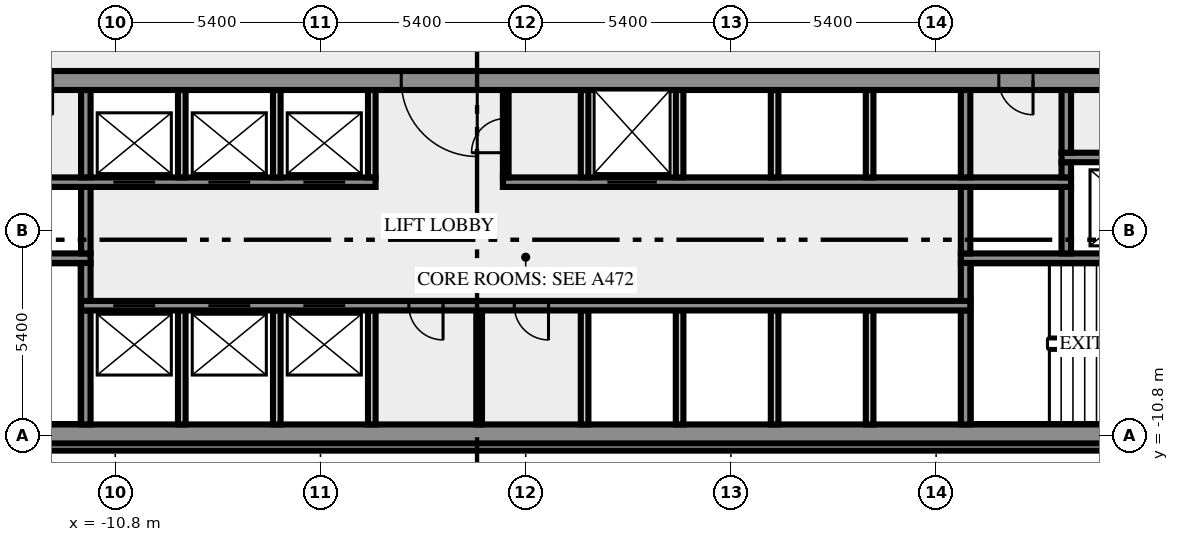
"""IFC4 building model, lengths in metres.
Left out: names, types, materials, properties, quantities, classifications, styles, units other than length and angle.
Written with IfcOpenShell. Run it as: python <this file> out.ifc"""

import sys

from ifc_helpers import new_model, si_unit, direction, frame, frame_2d, origin, place, context, subcontext, project, spatial, rectangle, extrude, element, fill, save


model = new_model("IFC4")
c1 = context("Model", 3, precision=1e-05, world=origin(), true_north=direction((0.0, 1.0)))
c2 = subcontext(c1, "Body", "Model", "MODEL_VIEW")
j1 = project(units=[si_unit("LENGTHUNIT", "METRE"), si_unit("PLANEANGLEUNIT", "RADIAN")], contexts=[c1])
p1 = place(None, origin())
s1 = spatial("IfcSite", under=j1, at=p1, CompositionType="ELEMENT")
p2 = place(p1, origin())
s2 = spatial("IfcBuilding", under=s1, at=p2, CompositionType="ELEMENT")
p3 = place(p2, frame((0.0, 0.0, 117.0)))
s3 = spatial("IfcBuildingStorey", under=s2, at=p3, CompositionType="ELEMENT", Elevation=117.0)
p4 = place(p3, frame((-17.444, -11.088, 0.0), z_axis=(0.0, 0.0, 1.0), x_axis=(1.0, 0.0, 0.0)))
e1 = element("IfcWall", 1, at=p4, inside=s3, PredefinedType="SOLIDWALL", context=c2, shape_type="SweptSolid", body=[
    extrude(rectangle(XDim=34.888, YDim=0.2, at=frame_2d((17.444, 0.0))), origin(), (0.0, 0.0, 1.0), 3.65),
])
p5 = place(p3, frame((-20.0, -10.75, 0.0), z_axis=(0.0, 0.0, 1.0), x_axis=(1.0, 0.0, 0.0)))
e2 = element("IfcWall", 2, at=p5, inside=s3, PredefinedType="SHEAR", context=c2, shape_type="SweptSolid", body=[
    extrude(rectangle(XDim=40.0, YDim=0.5, at=frame_2d((20.0, 0.0))), origin(), (0.0, 0.0, 1.0), 3.65),
])
p6 = place(p5, frame((0.8, 0.0, 1.0)))
e3 = element("IfcOpeningElement", 3, at=p6, cuts=e2, PredefinedType="OPENING", context=c2, shape_type="SweptSolid", body=[
    extrude(rectangle(XDim=1.2, YDim=1.2, at=frame_2d((0.6, 0.6))), frame((0.0, 0.26, 0.0), z_axis=(0.0, -1.0, 0.0), x_axis=(1.0, 0.0, 0.0)), (0.0, 0.0, 1.0), 0.52),
])
p7 = place(p5, frame((38.0, 0.0, 1.0)))
e4 = element("IfcOpeningElement", 4, at=p7, cuts=e2, PredefinedType="OPENING", context=c2, shape_type="SweptSolid", body=[
    extrude(rectangle(XDim=1.2, YDim=1.2, at=frame_2d((0.6, 0.6))), frame((0.0, 0.26, 0.0), z_axis=(0.0, -1.0, 0.0), x_axis=(1.0, 0.0, 0.0)), (0.0, 0.0, 1.0), 0.52),
])
p8 = place(p3, frame((-11.575, -10.5, 0.0), z_axis=(0.0, 0.0, 1.0), x_axis=(0.0, 1.0, 0.0)))
e5 = element("IfcWall", 5, at=p8, inside=s3, PredefinedType="SHEAR", context=c2, shape_type="SweptSolid", body=[
    extrude(rectangle(XDim=3.0, YDim=0.25, at=frame_2d((1.5, 0.0))), origin(), (0.0, 0.0, 1.0), 3.65),
])
for number, where, z_axis, x_axis in (
    (6, (-9.05, -10.5, 0.0), (0.0, 0.0, 1.0), (0.0, 1.0, 0.0)),
    (7, (-6.55, -10.5, 0.0), (0.0, 0.0, 1.0), (0.0, 1.0, 0.0)),
    (8, (-4.05, -10.5, 0.0), (0.0, 0.0, 1.0), (0.0, 1.0, 0.0)),
):
    element("IfcWall", number, at=place(p3, frame(where, z_axis=z_axis, x_axis=x_axis)), inside=s3, PredefinedType="SOLIDWALL", context=c2, shape_type="SweptSolid", body=[
        extrude(rectangle(XDim=3.0, YDim=0.2, at=frame_2d((1.5, 0.0))), origin(), (0.0, 0.0, 1.0), 3.65),
    ])
p9 = place(p3, frame((-1.225, -10.5, 0.0), z_axis=(0.0, 0.0, 1.0), x_axis=(0.0, 1.0, 0.0)))
e9 = element("IfcWall", 9, at=p9, inside=s3, PredefinedType="PARTITIONING", context=c2, shape_type="SweptSolid", body=[
    extrude(rectangle(XDim=3.0, YDim=0.15, at=frame_2d((1.5, 0.0))), origin(), (0.0, 0.0, 1.0), 3.65),
])
for number, where, z_axis, x_axis in (
    (10, (1.55, -10.5, 0.0), (0.0, 0.0, 1.0), (0.0, 1.0, 0.0)),
    (11, (4.05, -10.5, 0.0), (0.0, 0.0, 1.0), (0.0, 1.0, 0.0)),
    (12, (6.55, -10.5, 0.0), (0.0, 0.0, 1.0), (0.0, 1.0, 0.0)),
    (13, (9.05, -10.5, 0.0), (0.0, 0.0, 1.0), (0.0, 1.0, 0.0)),
):
    element("IfcWall", number, at=place(p3, frame(where, z_axis=z_axis, x_axis=x_axis)), inside=s3, PredefinedType="SOLIDWALL", context=c2, shape_type="SweptSolid", body=[
        extrude(rectangle(XDim=3.0, YDim=0.2, at=frame_2d((1.5, 0.0))), origin(), (0.0, 0.0, 1.0), 3.65),
    ])
p10 = place(p3, frame((11.575, -10.5, 0.0), z_axis=(0.0, 0.0, 1.0), x_axis=(0.0, 1.0, 0.0)))
e14 = element("IfcWall", 14, at=p10, inside=s3, PredefinedType="SHEAR", context=c2, shape_type="SweptSolid", body=[
    extrude(rectangle(XDim=3.0, YDim=0.25, at=frame_2d((1.5, 0.0))), origin(), (0.0, 0.0, 1.0), 3.65),
])
p11 = place(p3, frame((11.7, -7.375, 0.0), z_axis=(0.0, 0.0, 1.0), x_axis=(-1.0, 0.0, 0.0)))
e15 = element("IfcWall", 15, at=p11, inside=s3, PredefinedType="SHEAR", context=c2, shape_type="SweptSolid", body=[
    extrude(rectangle(XDim=23.4, YDim=0.25, at=frame_2d((11.7, 0.0))), origin(), (0.0, 0.0, 1.0), 3.65),
])
p12 = place(p11, frame((21.45, 0.0, 0.0)))
e16 = element("IfcOpeningElement", 16, at=p12, cuts=e15, PredefinedType="OPENING", context=c2, shape_type="SweptSolid", body=[
    extrude(rectangle(XDim=1.1, YDim=2.1, at=frame_2d((0.55, 1.05))), frame((0.0, 0.135, 0.0), z_axis=(0.0, -1.0, 0.0), x_axis=(1.0, 0.0, 0.0)), (0.0, 0.0, 1.0), 0.27),
])
p13 = place(p11, frame((18.95, 0.0, 0.0)))
e17 = element("IfcOpeningElement", 17, at=p13, cuts=e15, PredefinedType="OPENING", context=c2, shape_type="SweptSolid", body=[
    extrude(rectangle(XDim=1.1, YDim=2.1, at=frame_2d((0.55, 1.05))), frame((0.0, 0.135, 0.0), z_axis=(0.0, -1.0, 0.0), x_axis=(1.0, 0.0, 0.0)), (0.0, 0.0, 1.0), 0.27),
])
p14 = place(p11, frame((16.45, 0.0, 0.0)))
e18 = element("IfcOpeningElement", 18, at=p14, cuts=e15, PredefinedType="OPENING", context=c2, shape_type="SweptSolid", body=[
    extrude(rectangle(XDim=1.1, YDim=2.1, at=frame_2d((0.55, 1.05))), frame((0.0, 0.135, 0.0), z_axis=(0.0, -1.0, 0.0), x_axis=(1.0, 0.0, 0.0)), (0.0, 0.0, 1.0), 0.27),
])
p15 = place(p11, frame((13.875, 0.0, 0.0)))
e19 = element("IfcOpeningElement", 19, at=p15, cuts=e15, PredefinedType="OPENING", context=c2, shape_type="SweptSolid", body=[
    extrude(rectangle(XDim=0.9, YDim=2.1, at=frame_2d((0.45, 1.05))), frame((0.0, 0.135, 0.0), z_axis=(0.0, -1.0, 0.0), x_axis=(1.0, 0.0, 0.0)), (0.0, 0.0, 1.0), 0.27),
])
p16 = place(p11, frame((11.1, 0.0, 0.0)))
e20 = element("IfcOpeningElement", 20, at=p16, cuts=e15, PredefinedType="OPENING", context=c2, shape_type="SweptSolid", body=[
    extrude(rectangle(XDim=0.9, YDim=2.1, at=frame_2d((0.45, 1.05))), frame((0.0, 0.135, 0.0), z_axis=(0.0, -1.0, 0.0), x_axis=(1.0, 0.0, 0.0)), (0.0, 0.0, 1.0), 0.27),
])
for number, where, z_axis, x_axis in (
    (21, (-11.575, -7.25, 0.0), (0.0, 0.0, 1.0), (0.0, 1.0, 0.0)),
    (22, (11.575, -7.25, 0.0), (0.0, 0.0, 1.0), (0.0, 1.0, 0.0)),
):
    element("IfcWall", number, at=place(p3, frame(where, z_axis=z_axis, x_axis=x_axis)), inside=s3, PredefinedType="SHEAR", context=c2, shape_type="SweptSolid", body=[
        extrude(rectangle(XDim=1.0, YDim=0.25, at=frame_2d((0.5, 0.0))), origin(), (0.0, 0.0, 1.0), 3.65),
    ])
p17 = place(p3, frame((-11.45, -6.125, 0.0), z_axis=(0.0, 0.0, 1.0), x_axis=(-1.0, 0.0, 0.0)))
e23 = element("IfcWall", 23, at=p17, inside=s3, PredefinedType="SHEAR", context=c2, shape_type="SweptSolid", body=[
    extrude(rectangle(XDim=8.05, YDim=0.25, at=frame_2d((4.025, 0.0))), origin(), (0.0, 0.0, 1.0), 3.65),
])
p18 = place(p17, frame((6.2, 0.0, 0.0)))
e24 = element("IfcOpeningElement", 24, at=p18, cuts=e23, PredefinedType="OPENING", context=c2, shape_type="SweptSolid", body=[
    extrude(rectangle(XDim=1.8, YDim=2.1, at=frame_2d((0.9, 1.05))), frame((0.0, 0.135, 0.0), z_axis=(0.0, -1.0, 0.0), x_axis=(1.0, 0.0, 0.0)), (0.0, 0.0, 1.0), 0.27),
])
p19 = place(p3, frame((19.5, -6.125, 0.0), z_axis=(0.0, 0.0, 1.0), x_axis=(-1.0, 0.0, 0.0)))
e25 = element("IfcWall", 25, at=p19, inside=s3, PredefinedType="SHEAR", context=c2, shape_type="SweptSolid", body=[
    extrude(rectangle(XDim=8.05, YDim=0.25, at=frame_2d((4.025, 0.0))), origin(), (0.0, 0.0, 1.0), 3.65),
])
p20 = place(p19, frame((0.05, 0.0, 0.0)))
e26 = element("IfcOpeningElement", 26, at=p20, cuts=e25, PredefinedType="OPENING", context=c2, shape_type="SweptSolid", body=[
    extrude(rectangle(XDim=1.8, YDim=2.1, at=frame_2d((0.9, 1.05))), frame((0.0, 0.135, 0.0), z_axis=(0.0, -1.0, 0.0), x_axis=(1.0, 0.0, 0.0)), (0.0, 0.0, 1.0), 0.27),
])
for number, where, z_axis, x_axis in (
    (27, (-11.575, -6.0, 0.0), (0.0, 0.0, 1.0), (0.0, 1.0, 0.0)),
    (28, (11.575, -6.0, 0.0), (0.0, 0.0, 1.0), (0.0, 1.0, 0.0)),
    (29, (14.225, -6.0, 0.0), (0.0, 0.0, 1.0), (0.0, 1.0, 0.0)),
):
    element("IfcWall", number, at=place(p3, frame(where, z_axis=z_axis, x_axis=x_axis)), inside=s3, PredefinedType="SHEAR", context=c2, shape_type="SweptSolid", body=[
        extrude(rectangle(XDim=1.75, YDim=0.25, at=frame_2d((0.875, 0.0))), origin(), (0.0, 0.0, 1.0), 3.65),
    ])
p21 = place(p3, frame((-14.35, -4.125, 0.0), z_axis=(0.0, 0.0, 1.0), x_axis=(1.0, 0.0, 0.0)))
e30 = element("IfcWall", 30, at=p21, inside=s3, PredefinedType="SHEAR", context=c2, shape_type="SweptSolid", body=[
    extrude(rectangle(XDim=10.4, YDim=0.25, at=frame_2d((5.2, 0.0))), origin(), (0.0, 0.0, 1.0), 3.65),
])
p22 = place(p21, frame((3.5, 0.0, 0.0)))
e31 = element("IfcOpeningElement", 31, at=p22, cuts=e30, PredefinedType="OPENING", context=c2, shape_type="SweptSolid", body=[
    extrude(rectangle(XDim=1.1, YDim=2.1, at=frame_2d((0.55, 1.05))), frame((0.0, 0.135, 0.0), z_axis=(0.0, -1.0, 0.0), x_axis=(1.0, 0.0, 0.0)), (0.0, 0.0, 1.0), 0.27),
])
p23 = place(p21, frame((6.0, 0.0, 0.0)))
e32 = element("IfcOpeningElement", 32, at=p23, cuts=e30, PredefinedType="OPENING", context=c2, shape_type="SweptSolid", body=[
    extrude(rectangle(XDim=1.1, YDim=2.1, at=frame_2d((0.55, 1.05))), frame((0.0, 0.135, 0.0), z_axis=(0.0, -1.0, 0.0), x_axis=(1.0, 0.0, 0.0)), (0.0, 0.0, 1.0), 0.27),
])
p24 = place(p21, frame((8.5, 0.0, 0.0)))
e33 = element("IfcOpeningElement", 33, at=p24, cuts=e30, PredefinedType="OPENING", context=c2, shape_type="SweptSolid", body=[
    extrude(rectangle(XDim=1.1, YDim=2.1, at=frame_2d((0.55, 1.05))), frame((0.0, 0.135, 0.0), z_axis=(0.0, -1.0, 0.0), x_axis=(1.0, 0.0, 0.0)), (0.0, 0.0, 1.0), 0.27),
])
p25 = place(p3, frame((-0.6, -4.125, 0.0), z_axis=(0.0, 0.0, 1.0), x_axis=(1.0, 0.0, 0.0)))
e34 = element("IfcWall", 34, at=p25, inside=s3, PredefinedType="SHEAR", context=c2, shape_type="SweptSolid", body=[
    extrude(rectangle(XDim=14.95, YDim=0.25, at=frame_2d((7.475, 0.0))), origin(), (0.0, 0.0, 1.0), 3.65),
])
p26 = place(p25, frame((2.75, 0.0, 0.0)))
e35 = element("IfcOpeningElement", 35, at=p26, cuts=e34, PredefinedType="OPENING", context=c2, shape_type="SweptSolid", body=[
    extrude(rectangle(XDim=1.3, YDim=2.1, at=frame_2d((0.65, 1.05))), frame((0.0, 0.135, 0.0), z_axis=(0.0, -1.0, 0.0), x_axis=(1.0, 0.0, 0.0)), (0.0, 0.0, 1.0), 0.27),
])
p27 = place(p3, frame((-11.575, -4.0, 0.0), z_axis=(0.0, 0.0, 1.0), x_axis=(0.0, 1.0, 0.0)))
e36 = element("IfcWall", 36, at=p27, inside=s3, PredefinedType="SHEAR", context=c2, shape_type="SweptSolid", body=[
    extrude(rectangle(XDim=2.3, YDim=0.25, at=frame_2d((1.15, 0.0))), origin(), (0.0, 0.0, 1.0), 3.65),
])
for number, where, z_axis, x_axis in (
    (37, (-9.05, -4.0, 0.0), (0.0, 0.0, 1.0), (0.0, 1.0, 0.0)),
    (38, (-6.55, -4.0, 0.0), (0.0, 0.0, 1.0), (0.0, 1.0, 0.0)),
    (39, (-4.05, -4.0, 0.0), (0.0, 0.0, 1.0), (0.0, 1.0, 0.0)),
):
    element("IfcWall", number, at=place(p3, frame(where, z_axis=z_axis, x_axis=x_axis)), inside=s3, PredefinedType="SOLIDWALL", context=c2, shape_type="SweptSolid", body=[
        extrude(rectangle(XDim=2.3, YDim=0.2, at=frame_2d((1.15, 0.0))), origin(), (0.0, 0.0, 1.0), 3.65),
    ])
p28 = place(p3, frame((-0.525, -4.0, 0.0), z_axis=(0.0, 0.0, 1.0), x_axis=(0.0, 1.0, 0.0)))
e40 = element("IfcWall", 40, at=p28, inside=s3, PredefinedType="PARTITIONING", context=c2, shape_type="SweptSolid", body=[
    extrude(rectangle(XDim=2.3, YDim=0.15, at=frame_2d((1.15, 0.0))), origin(), (0.0, 0.0, 1.0), 3.65),
])
p29 = place(p28, frame((0.65, 0.0, 0.0)))
e41 = element("IfcOpeningElement", 41, at=p29, cuts=e40, PredefinedType="OPENING", context=c2, shape_type="SweptSolid", body=[
    extrude(rectangle(XDim=0.9, YDim=2.1, at=frame_2d((0.45, 1.05))), frame((0.0, 0.085, 0.0), z_axis=(0.0, -1.0, 0.0), x_axis=(1.0, 0.0, 0.0)), (0.0, 0.0, 1.0), 0.17),
])
for number, where, z_axis, x_axis in (
    (42, (1.55, -4.0, 0.0), (0.0, 0.0, 1.0), (0.0, 1.0, 0.0)),
    (43, (4.05, -4.0, 0.0), (0.0, 0.0, 1.0), (0.0, 1.0, 0.0)),
    (44, (6.55, -4.0, 0.0), (0.0, 0.0, 1.0), (0.0, 1.0, 0.0)),
    (45, (9.05, -4.0, 0.0), (0.0, 0.0, 1.0), (0.0, 1.0, 0.0)),
):
    element("IfcWall", number, at=place(p3, frame(where, z_axis=z_axis, x_axis=x_axis)), inside=s3, PredefinedType="SOLIDWALL", context=c2, shape_type="SweptSolid", body=[
        extrude(rectangle(XDim=2.3, YDim=0.2, at=frame_2d((1.15, 0.0))), origin(), (0.0, 0.0, 1.0), 3.65),
    ])
p30 = place(p3, frame((11.575, -4.0, 0.0), z_axis=(0.0, 0.0, 1.0), x_axis=(0.0, 1.0, 0.0)))
e46 = element("IfcWall", 46, at=p30, inside=s3, PredefinedType="SHEAR", context=c2, shape_type="SweptSolid", body=[
    extrude(rectangle(XDim=2.3, YDim=0.25, at=frame_2d((1.15, 0.0))), origin(), (0.0, 0.0, 1.0), 3.65),
])
p31 = place(p3, frame((14.225, -4.0, 0.0), z_axis=(0.0, 0.0, 1.0), x_axis=(0.0, 1.0, 0.0)))
e47 = element("IfcWall", 47, at=p31, inside=s3, PredefinedType="SHEAR", context=c2, shape_type="SweptSolid", body=[
    extrude(rectangle(XDim=0.4, YDim=0.25, at=frame_2d((0.2, 0.0))), origin(), (0.0, 0.0, 1.0), 3.65),
])
p32 = place(p3, frame((14.1, -3.475, 0.0), z_axis=(0.0, 0.0, 1.0), x_axis=(1.0, 0.0, 0.0)))
e48 = element("IfcWall", 48, at=p32, inside=s3, PredefinedType="SHEAR", context=c2, shape_type="SweptSolid", body=[
    extrude(rectangle(XDim=3.25, YDim=0.25, at=frame_2d((1.625, 0.0))), origin(), (0.0, 0.0, 1.0), 3.65),
])
p33 = place(p3, frame((14.225, -3.35, 0.0), z_axis=(0.0, 0.0, 1.0), x_axis=(0.0, 1.0, 0.0)))
e49 = element("IfcWall", 49, at=p33, inside=s3, PredefinedType="SHEAR", context=c2, shape_type="SweptSolid", body=[
    extrude(rectangle(XDim=1.65, YDim=0.25, at=frame_2d((0.825, 0.0))), origin(), (0.0, 0.0, 1.0), 3.65),
])
p34 = place(p3, frame((20.49, -1.45, 0.0), z_axis=(0.0, 0.0, 1.0), x_axis=(-1.0, 0.0, 0.0)))
e50 = element("IfcWall", 50, at=p34, inside=s3, PredefinedType="SHEAR", context=c2, shape_type="SweptSolid", body=[
    extrude(rectangle(XDim=40.98, YDim=0.5, at=frame_2d((20.49, 0.0))), origin(), (0.0, 0.0, 1.0), 3.65),
])
p35 = place(p34, frame((38.14, 0.0, 0.0)))
e51 = element("IfcOpeningElement", 51, at=p35, cuts=e50, PredefinedType="OPENING", context=c2, shape_type="SweptSolid", body=[
    extrude(rectangle(XDim=1.8, YDim=2.1, at=frame_2d((0.9, 1.05))), frame((0.0, 0.26, 0.0), z_axis=(0.0, -1.0, 0.0), x_axis=(1.0, 0.0, 0.0)), (0.0, 0.0, 1.0), 0.52),
])
p36 = place(p34, frame((36.728, 0.0, 0.0)))
e52 = element("IfcOpeningElement", 52, at=p36, cuts=e50, PredefinedType="OPENING", context=c2, shape_type="SweptSolid", body=[
    extrude(rectangle(XDim=0.8, YDim=2.1, at=frame_2d((0.4, 1.05))), frame((0.0, 0.26, 0.0), z_axis=(0.0, -1.0, 0.0), x_axis=(1.0, 0.0, 0.0)), (0.0, 0.0, 1.0), 0.52),
])
p37 = place(p34, frame((35.153, 0.0, 0.0)))
e53 = element("IfcOpeningElement", 53, at=p37, cuts=e50, PredefinedType="OPENING", context=c2, shape_type="SweptSolid", body=[
    extrude(rectangle(XDim=0.8, YDim=2.1, at=frame_2d((0.4, 1.05))), frame((0.0, 0.26, 0.0), z_axis=(0.0, -1.0, 0.0), x_axis=(1.0, 0.0, 0.0)), (0.0, 0.0, 1.0), 0.52),
])
p38 = place(p34, frame((32.94, 0.0, 0.0)))
e54 = element("IfcOpeningElement", 54, at=p38, cuts=e50, PredefinedType="OPENING", context=c2, shape_type="SweptSolid", body=[
    extrude(rectangle(XDim=0.9, YDim=2.1, at=frame_2d((0.45, 1.05))), frame((0.0, 0.26, 0.0), z_axis=(0.0, -1.0, 0.0), x_axis=(1.0, 0.0, 0.0)), (0.0, 0.0, 1.0), 0.52),
])
p39 = place(p34, frame((21.765, 0.0, 0.0)))
e55 = element("IfcOpeningElement", 55, at=p39, cuts=e50, PredefinedType="OPENING", context=c2, shape_type="SweptSolid", body=[
    extrude(rectangle(XDim=2.0, YDim=2.1, at=frame_2d((1.0, 1.05))), frame((0.0, 0.26, 0.0), z_axis=(0.0, -1.0, 0.0), x_axis=(1.0, 0.0, 0.0)), (0.0, 0.0, 1.0), 0.52),
])
p40 = place(p34, frame((7.14, 0.0, 0.0)))
e56 = element("IfcOpeningElement", 56, at=p40, cuts=e50, PredefinedType="OPENING", context=c2, shape_type="SweptSolid", body=[
    extrude(rectangle(XDim=0.9, YDim=2.1, at=frame_2d((0.45, 1.05))), frame((0.0, 0.26, 0.0), z_axis=(0.0, -1.0, 0.0), x_axis=(1.0, 0.0, 0.0)), (0.0, 0.0, 1.0), 0.52),
])
p41 = place(p34, frame((4.19, 0.0, 0.0)))
e57 = element("IfcOpeningElement", 57, at=p41, cuts=e50, PredefinedType="OPENING", context=c2, shape_type="SweptSolid", body=[
    extrude(rectangle(XDim=0.9, YDim=2.1, at=frame_2d((0.45, 1.05))), frame((0.0, 0.26, 0.0), z_axis=(0.0, -1.0, 0.0), x_axis=(1.0, 0.0, 0.0)), (0.0, 0.0, 1.0), 0.52),
])
p42 = place(p34, frame((1.04, 0.0, 0.0)))
e58 = element("IfcOpeningElement", 58, at=p42, cuts=e50, PredefinedType="OPENING", context=c2, shape_type="SweptSolid", body=[
    extrude(rectangle(XDim=1.8, YDim=2.1, at=frame_2d((0.9, 1.05))), frame((0.0, 0.26, 0.0), z_axis=(0.0, -1.0, 0.0), x_axis=(1.0, 0.0, 0.0)), (0.0, 0.0, 1.0), 0.52),
])
p43 = place(p12, origin())
e59 = element("IfcDoor", 59, at=p43, inside=s3, OperationType="DOUBLE_DOOR_SLIDING", PredefinedType="DOOR", context=c2, shape_type="SweptSolid", body=[
    extrude(rectangle(XDim=1.1, YDim=2.1, at=frame_2d((0.55, 1.05))), frame((0.0, 0.025, 0.0), z_axis=(0.0, -1.0, 0.0), x_axis=(1.0, 0.0, 0.0)), (0.0, 0.0, 1.0), 0.05),
])
fill(e16, e59)
p44 = place(p13, origin())
e60 = element("IfcDoor", 60, at=p44, inside=s3, OperationType="DOUBLE_DOOR_SLIDING", PredefinedType="DOOR", context=c2, shape_type="SweptSolid", body=[
    extrude(rectangle(XDim=1.1, YDim=2.1, at=frame_2d((0.55, 1.05))), frame((0.0, 0.025, 0.0), z_axis=(0.0, -1.0, 0.0), x_axis=(1.0, 0.0, 0.0)), (0.0, 0.0, 1.0), 0.05),
])
fill(e17, e60)
p45 = place(p14, origin())
e61 = element("IfcDoor", 61, at=p45, inside=s3, OperationType="DOUBLE_DOOR_SLIDING", PredefinedType="DOOR", context=c2, shape_type="SweptSolid", body=[
    extrude(rectangle(XDim=1.1, YDim=2.1, at=frame_2d((0.55, 1.05))), frame((0.0, 0.025, 0.0), z_axis=(0.0, -1.0, 0.0), x_axis=(1.0, 0.0, 0.0)), (0.0, 0.0, 1.0), 0.05),
])
fill(e18, e61)
p46 = place(p15, origin())
e62 = element("IfcDoor", 62, at=p46, inside=s3, OperationType="SINGLE_SWING_RIGHT", PredefinedType="DOOR", context=c2, shape_type="SweptSolid", body=[
    extrude(rectangle(XDim=0.9, YDim=2.1, at=frame_2d((0.45, 1.05))), frame((0.0, 0.025, 0.0), z_axis=(0.0, -1.0, 0.0), x_axis=(1.0, 0.0, 0.0)), (0.0, 0.0, 1.0), 0.05),
])
fill(e19, e62)
p47 = place(p16, origin())
e63 = element("IfcDoor", 63, at=p47, inside=s3, OperationType="SINGLE_SWING_LEFT", PredefinedType="DOOR", context=c2, shape_type="SweptSolid", body=[
    extrude(rectangle(XDim=0.9, YDim=2.1, at=frame_2d((0.45, 1.05))), frame((0.0, 0.025, 0.0), z_axis=(0.0, -1.0, 0.0), x_axis=(1.0, 0.0, 0.0)), (0.0, 0.0, 1.0), 0.05),
])
fill(e20, e63)
p48 = place(p22, origin())
e64 = element("IfcDoor", 64, at=p48, inside=s3, OperationType="DOUBLE_DOOR_SLIDING", PredefinedType="DOOR", context=c2, shape_type="SweptSolid", body=[
    extrude(rectangle(XDim=1.1, YDim=2.1, at=frame_2d((0.55, 1.05))), frame((0.0, 0.025, 0.0), z_axis=(0.0, -1.0, 0.0), x_axis=(1.0, 0.0, 0.0)), (0.0, 0.0, 1.0), 0.05),
])
fill(e31, e64)
p49 = place(p23, origin())
e65 = element("IfcDoor", 65, at=p49, inside=s3, OperationType="DOUBLE_DOOR_SLIDING", PredefinedType="DOOR", context=c2, shape_type="SweptSolid", body=[
    extrude(rectangle(XDim=1.1, YDim=2.1, at=frame_2d((0.55, 1.05))), frame((0.0, 0.025, 0.0), z_axis=(0.0, -1.0, 0.0), x_axis=(1.0, 0.0, 0.0)), (0.0, 0.0, 1.0), 0.05),
])
fill(e32, e65)
p50 = place(p24, origin())
e66 = element("IfcDoor", 66, at=p50, inside=s3, OperationType="DOUBLE_DOOR_SLIDING", PredefinedType="DOOR", context=c2, shape_type="SweptSolid", body=[
    extrude(rectangle(XDim=1.1, YDim=2.1, at=frame_2d((0.55, 1.05))), frame((0.0, 0.025, 0.0), z_axis=(0.0, -1.0, 0.0), x_axis=(1.0, 0.0, 0.0)), (0.0, 0.0, 1.0), 0.05),
])
fill(e33, e66)
p51 = place(p26, origin())
e67 = element("IfcDoor", 67, at=p51, inside=s3, OperationType="DOUBLE_DOOR_SLIDING", PredefinedType="DOOR", context=c2, shape_type="SweptSolid", body=[
    extrude(rectangle(XDim=1.3, YDim=2.1, at=frame_2d((0.65, 1.05))), frame((0.0, 0.025, 0.0), z_axis=(0.0, -1.0, 0.0), x_axis=(1.0, 0.0, 0.0)), (0.0, 0.0, 1.0), 0.05),
])
fill(e35, e67)
p52 = place(p29, origin())
e68 = element("IfcDoor", 68, at=p52, inside=s3, OperationType="SINGLE_SWING_LEFT", PredefinedType="DOOR", context=c2, shape_type="SweptSolid", body=[
    extrude(rectangle(XDim=0.9, YDim=2.1, at=frame_2d((0.45, 1.05))), frame((0.0, 0.025, 0.0), z_axis=(0.0, -1.0, 0.0), x_axis=(1.0, 0.0, 0.0)), (0.0, 0.0, 1.0), 0.05),
])
fill(e41, e68)
p53 = place(p39, origin())
e69 = element("IfcDoor", 69, at=p53, inside=s3, OperationType="DOUBLE_DOOR_SINGLE_SWING", PredefinedType="DOOR", context=c2, shape_type="SweptSolid", body=[
    extrude(rectangle(XDim=2.0, YDim=2.1, at=frame_2d((1.0, 1.05))), frame((0.0, 0.025, 0.0), z_axis=(0.0, -1.0, 0.0), x_axis=(1.0, 0.0, 0.0)), (0.0, 0.0, 1.0), 0.05),
])
fill(e55, e69)
p54 = place(p40, origin())
e70 = element("IfcDoor", 70, at=p54, inside=s3, OperationType="SINGLE_SWING_LEFT", PredefinedType="DOOR", context=c2, shape_type="SweptSolid", body=[
    extrude(rectangle(XDim=0.9, YDim=2.1, at=frame_2d((0.45, 1.05))), frame((0.0, 0.025, 0.0), z_axis=(0.0, -1.0, 0.0), x_axis=(1.0, 0.0, 0.0)), (0.0, 0.0, 1.0), 0.05),
])
fill(e56, e70)
save(model, sys.argv[1])
